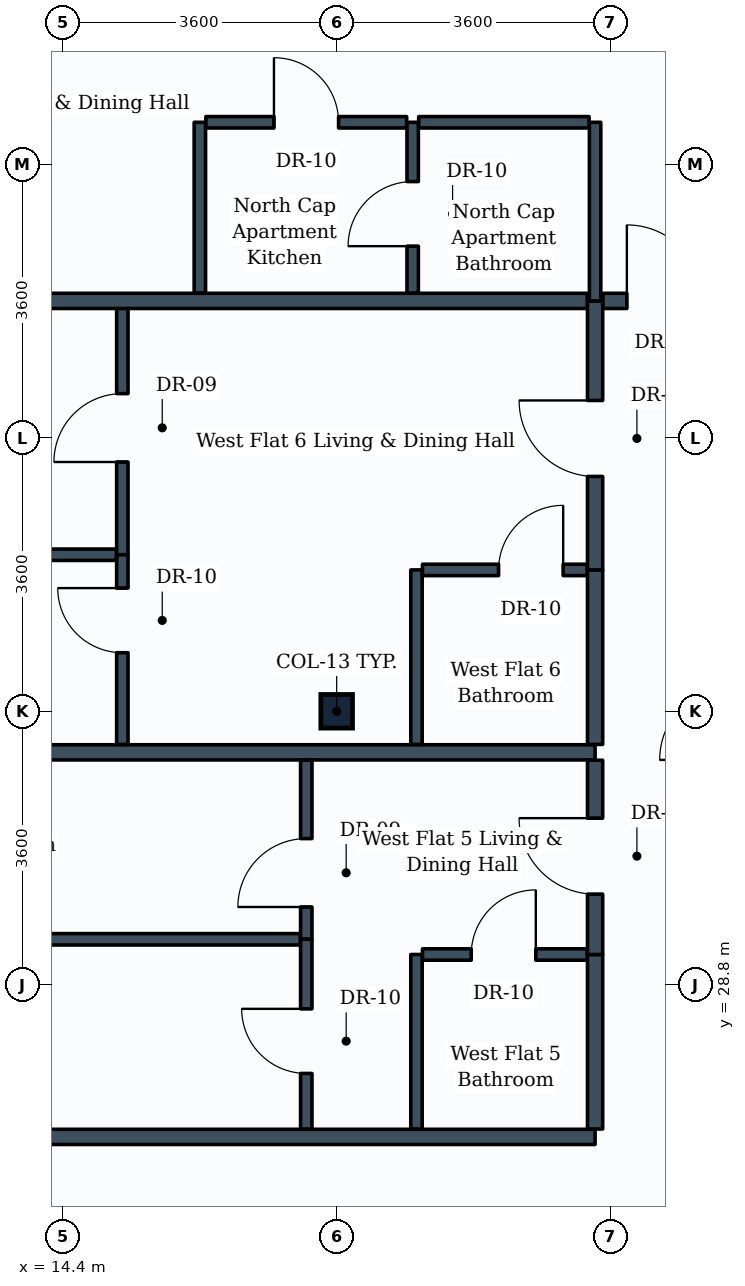
"""IFC4 building model, lengths in metres.
Left out: names, types, materials, properties, quantities, classifications, styles, units other than length and angle.
Written with IfcOpenShell. Run it as: python <this file> out.ifc"""

import sys

from ifc_helpers import new_model, si_unit, direction, frame, frame_2d, origin, origin_2d, place, context, subcontext, project, spatial, rectangle, i_section, extrude, element, fill, save


model = new_model("IFC4")
c1 = context("Model", 3, precision=1e-05, world=origin(), true_north=direction((0.0, 1.0)))
c2 = subcontext(c1, "Body", "Model", "MODEL_VIEW")
j1 = project(units=[si_unit("LENGTHUNIT", "METRE"), si_unit("PLANEANGLEUNIT", "RADIAN")], contexts=[c1])
p1 = place(None, origin())
s1 = spatial("IfcSite", under=j1, at=p1, CompositionType="ELEMENT")
p2 = place(p1, origin())
s2 = spatial("IfcBuilding", under=s1, at=p2, CompositionType="ELEMENT")
p3 = place(p2, frame((0.0, 0.0, 165.6)))
s3 = spatial("IfcBuildingStorey", under=s2, at=p3, CompositionType="ELEMENT", Elevation=165.6)
p4 = place(p3, frame((18.0, 32.4, 0.0), z_axis=(0.0, 0.0, 1.0), x_axis=(1.0, 0.0, 0.0)))
e1 = element("IfcColumn", 1, at=p4, inside=s3, PredefinedType="COLUMN", context=c2, shape_type="SweptSolid", body=[
    extrude(i_section(OverallWidth=0.416, OverallDepth=0.442, WebThickness=0.025, FlangeThickness=0.041, FilletRadius=0.015, at=origin_2d()), origin(), (0.0, 0.0, 1.0), 3.8),
])
for number, where, z_axis, x_axis in (
    (2, (7.354, 26.8, 0.0), (0.0, 0.0, 1.0), (1.0, 0.0, 0.0)),
    (3, (7.354, 31.86, 0.0), (0.0, 0.0, 1.0), (1.0, 0.0, 0.0)),
):
    element("IfcWall", number, at=place(p3, frame(where, z_axis=z_axis, x_axis=x_axis)), inside=s3, PredefinedType="PARTITIONING", context=c2, shape_type="SweptSolid", body=[
        extrude(rectangle(XDim=14.046, YDim=0.2, at=frame_2d((7.023, 0.0))), origin(), (0.0, 0.0, 1.0), 2.93),
    ])
p5 = place(p3, frame((21.4, 26.904, 0.0), z_axis=(0.0, 0.0, 1.0), x_axis=(0.0, 1.0, 0.0)))
e4 = element("IfcWall", 4, at=p5, inside=s3, PredefinedType="PARTITIONING", context=c2, shape_type="SweptSolid", body=[
    extrude(rectangle(XDim=2.296, YDim=0.2, at=frame_2d((1.148, 0.0))), origin(), (0.0, 0.0, 1.0), 3.1),
])
p6 = place(p3, frame((19.05, 26.904, 0.0), z_axis=(0.0, 0.0, 1.0), x_axis=(0.0, 1.0, 0.0)))
e5 = element("IfcWall", 5, at=p6, inside=s3, PredefinedType="PARTITIONING", context=c2, shape_type="SweptSolid", body=[
    extrude(rectangle(XDim=2.296, YDim=0.15, at=frame_2d((1.148, 0.0))), origin(), (0.0, 0.0, 1.0), 3.1),
])
p7 = place(p3, frame((19.129, 29.2, 0.0), z_axis=(0.0, 0.0, 1.0), x_axis=(1.0, 0.0, 0.0)))
e6 = element("IfcWall", 6, at=p7, inside=s3, PredefinedType="PARTITIONING", context=c2, shape_type="SweptSolid", body=[
    extrude(rectangle(XDim=2.167, YDim=0.15, at=frame_2d((1.083, 0.0))), origin(), (0.0, 0.0, 1.0), 3.465),
])
p8 = place(p7, frame((0.641, 0.0, 0.0)))
e7 = element("IfcOpeningElement", 7, at=p8, cuts=e6, PredefinedType="OPENING", context=c2, shape_type="SweptSolid", body=[
    extrude(rectangle(XDim=0.85, YDim=2.1, at=frame_2d((0.425, 1.05))), frame((0.0, 0.085, 0.0), z_axis=(0.0, -1.0, 0.0), x_axis=(1.0, 0.0, 0.0)), (0.0, 0.0, 1.0), 0.17),
])
p9 = place(p3, frame((21.4, 29.2, 0.0), z_axis=(0.0, 0.0, 1.0), x_axis=(0.0, 1.0, 0.0)))
e8 = element("IfcWall", 8, at=p9, inside=s3, PredefinedType="PARTITIONING", context=c2, shape_type="SweptSolid", body=[
    extrude(rectangle(XDim=2.556, YDim=0.2, at=frame_2d((1.278, 0.0))), origin(), (0.0, 0.0, 1.0), 3.13),
])
p10 = place(p9, frame((0.794, 0.0, 0.0)))
e9 = element("IfcOpeningElement", 9, at=p10, cuts=e8, PredefinedType="OPENING", context=c2, shape_type="SweptSolid", body=[
    extrude(rectangle(XDim=1.0, YDim=2.1, at=frame_2d((0.5, 1.05))), frame((0.0, 0.11, 0.0), z_axis=(0.0, -1.0, 0.0), x_axis=(1.0, 0.0, 0.0)), (0.0, 0.0, 1.0), 0.22),
])
p11 = place(p3, frame((17.6, 29.4, 0.0), z_axis=(0.0, 0.0, 1.0), x_axis=(0.0, 1.0, 0.0)))
e10 = element("IfcWall", 10, at=p11, inside=s3, PredefinedType="PARTITIONING", context=c2, shape_type="SweptSolid", body=[
    extrude(rectangle(XDim=2.356, YDim=0.15, at=frame_2d((1.178, 0.0))), origin(), (0.0, 0.0, 1.0), 3.465),
])
p12 = place(p11, frame((0.425, 0.0, 0.0)))
e11 = element("IfcOpeningElement", 11, at=p12, cuts=e10, PredefinedType="OPENING", context=c2, shape_type="SweptSolid", body=[
    extrude(rectangle(XDim=0.9, YDim=2.1, at=frame_2d((0.45, 1.05))), frame((0.0, 0.085, 0.0), z_axis=(0.0, -1.0, 0.0), x_axis=(1.0, 0.0, 0.0)), (0.0, 0.0, 1.0), 0.17),
])
p13 = place(p3, frame((17.6, 26.904, 0.0), z_axis=(0.0, 0.0, 1.0), x_axis=(0.0, 1.0, 0.0)))
e12 = element("IfcWall", 12, at=p13, inside=s3, PredefinedType="PARTITIONING", context=c2, shape_type="SweptSolid", body=[
    extrude(rectangle(XDim=2.496, YDim=0.15, at=frame_2d((1.248, 0.0))), origin(), (0.0, 0.0, 1.0), 3.1),
])
p14 = place(p13, frame((0.731, 0.0, 0.0)))
e13 = element("IfcOpeningElement", 13, at=p14, cuts=e12, PredefinedType="OPENING", context=c2, shape_type="SweptSolid", body=[
    extrude(rectangle(XDim=0.85, YDim=2.1, at=frame_2d((0.425, 1.05))), frame((0.0, 0.085, 0.0), z_axis=(0.0, -1.0, 0.0), x_axis=(1.0, 0.0, 0.0)), (0.0, 0.0, 1.0), 0.17),
])
p15 = place(p3, frame((7.354, 29.4, 0.0), z_axis=(0.0, 0.0, 1.0), x_axis=(1.0, 0.0, 0.0)))
e14 = element("IfcWall", 14, at=p15, inside=s3, PredefinedType="PARTITIONING", context=c2, shape_type="SweptSolid", body=[
    extrude(rectangle(XDim=10.167, YDim=0.15, at=frame_2d((5.083, 0.0))), origin(), (0.0, 0.0, 1.0), 2.93),
])
p16 = place(p3, frame((21.4, 31.964, 0.0), z_axis=(0.0, 0.0, 1.0), x_axis=(0.0, 1.0, 0.0)))
e15 = element("IfcWall", 15, at=p16, inside=s3, PredefinedType="PARTITIONING", context=c2, shape_type="SweptSolid", body=[
    extrude(rectangle(XDim=2.296, YDim=0.2, at=frame_2d((1.148, 0.0))), origin(), (0.0, 0.0, 1.0), 3.11),
])
p17 = place(p3, frame((19.05, 31.964, 0.0), z_axis=(0.0, 0.0, 1.0), x_axis=(0.0, 1.0, 0.0)))
e16 = element("IfcWall", 16, at=p17, inside=s3, PredefinedType="PARTITIONING", context=c2, shape_type="SweptSolid", body=[
    extrude(rectangle(XDim=2.296, YDim=0.15, at=frame_2d((1.148, 0.0))), origin(), (0.0, 0.0, 1.0), 3.11),
])
p18 = place(p3, frame((19.129, 34.26, 0.0), z_axis=(0.0, 0.0, 1.0), x_axis=(1.0, 0.0, 0.0)))
e17 = element("IfcWall", 17, at=p18, inside=s3, PredefinedType="PARTITIONING", context=c2, shape_type="SweptSolid", body=[
    extrude(rectangle(XDim=2.167, YDim=0.15, at=frame_2d((1.083, 0.0))), origin(), (0.0, 0.0, 1.0), 3.465),
])
p19 = place(p18, frame((1.001, 0.0, 0.0)))
e18 = element("IfcOpeningElement", 18, at=p19, cuts=e17, PredefinedType="OPENING", context=c2, shape_type="SweptSolid", body=[
    extrude(rectangle(XDim=0.85, YDim=2.1, at=frame_2d((0.425, 1.05))), frame((0.0, 0.085, 0.0), z_axis=(0.0, -1.0, 0.0), x_axis=(1.0, 0.0, 0.0)), (0.0, 0.0, 1.0), 0.17),
])
p20 = place(p3, frame((21.4, 34.26, 0.0), z_axis=(0.0, 0.0, 1.0), x_axis=(0.0, 1.0, 0.0)))
e19 = element("IfcWall", 19, at=p20, inside=s3, PredefinedType="PARTITIONING", context=c2, shape_type="SweptSolid", body=[
    extrude(rectangle(XDim=3.54, YDim=0.2, at=frame_2d((1.77, 0.0))), origin(), (0.0, 0.0, 1.0), 3.1),
])
p21 = place(p20, frame((1.23, 0.0, 0.0)))
e20 = element("IfcOpeningElement", 20, at=p21, cuts=e19, PredefinedType="OPENING", context=c2, shape_type="SweptSolid", body=[
    extrude(rectangle(XDim=1.0, YDim=2.1, at=frame_2d((0.5, 1.05))), frame((0.0, 0.11, 0.0), z_axis=(0.0, -1.0, 0.0), x_axis=(1.0, 0.0, 0.0)), (0.0, 0.0, 1.0), 0.22),
])
p22 = place(p3, frame((15.18, 34.46, 0.0), z_axis=(0.0, 0.0, 1.0), x_axis=(0.0, 1.0, 0.0)))
e21 = element("IfcWall", 21, at=p22, inside=s3, PredefinedType="PARTITIONING", context=c2, shape_type="SweptSolid", body=[
    extrude(rectangle(XDim=3.34, YDim=0.15, at=frame_2d((1.67, 0.0))), origin(), (0.0, 0.0, 1.0), 3.1),
])
p23 = place(p22, frame((1.22, 0.0, 0.0)))
e22 = element("IfcOpeningElement", 22, at=p23, cuts=e21, PredefinedType="OPENING", context=c2, shape_type="SweptSolid", body=[
    extrude(rectangle(XDim=0.9, YDim=2.1, at=frame_2d((0.45, 1.05))), frame((0.0, 0.085, 0.0), z_axis=(0.0, -1.0, 0.0), x_axis=(1.0, 0.0, 0.0)), (0.0, 0.0, 1.0), 0.17),
])
p24 = place(p3, frame((15.18, 31.964, 0.0), z_axis=(0.0, 0.0, 1.0), x_axis=(0.0, 1.0, 0.0)))
e23 = element("IfcWall", 23, at=p24, inside=s3, PredefinedType="PARTITIONING", context=c2, shape_type="SweptSolid", body=[
    extrude(rectangle(XDim=2.496, YDim=0.15, at=frame_2d((1.248, 0.0))), origin(), (0.0, 0.0, 1.0), 3.11),
])
p25 = place(p24, frame((1.207, 0.0, 0.0)))
e24 = element("IfcOpeningElement", 24, at=p25, cuts=e23, PredefinedType="OPENING", context=c2, shape_type="SweptSolid", body=[
    extrude(rectangle(XDim=0.85, YDim=2.1, at=frame_2d((0.425, 1.05))), frame((0.0, 0.085, 0.0), z_axis=(0.0, -1.0, 0.0), x_axis=(1.0, 0.0, 0.0)), (0.0, 0.0, 1.0), 0.17),
])
p26 = place(p3, frame((7.354, 34.46, 0.0), z_axis=(0.0, 0.0, 1.0), x_axis=(1.0, 0.0, 0.0)))
e25 = element("IfcWall", 25, at=p26, inside=s3, PredefinedType="PARTITIONING", context=c2, shape_type="SweptSolid", body=[
    extrude(rectangle(XDim=7.747, YDim=0.15, at=frame_2d((3.874, 0.0))), origin(), (0.0, 0.0, 1.0), 2.93),
])
p27 = place(p3, frame((7.354, 37.8, 0.0), z_axis=(0.0, 0.0, 1.0), x_axis=(1.0, 0.0, 0.0)))
e26 = element("IfcWall", 26, at=p27, inside=s3, PredefinedType="PARTITIONING", context=c2, shape_type="SweptSolid", body=[
    extrude(rectangle(XDim=13.942, YDim=0.2, at=frame_2d((6.971, 0.0))), origin(), (0.0, 0.0, 1.0), 2.93),
])
p28 = place(p3, frame((21.504, 37.8, 0.0), z_axis=(0.0, 0.0, 1.0), x_axis=(1.0, 0.0, 0.0)))
e27 = element("IfcWall", 27, at=p28, inside=s3, PredefinedType="PARTITIONING", context=c2, shape_type="SweptSolid", body=[
    extrude(rectangle(XDim=1.667, YDim=0.2, at=frame_2d((0.833, 0.0))), origin(), (0.0, 0.0, 1.0), 3.465),
])
p29 = place(p28, frame((0.314, 0.0, 0.0)))
e28 = element("IfcOpeningElement", 28, at=p29, cuts=e27, PredefinedType="OPENING", context=c2, shape_type="SweptSolid", body=[
    extrude(rectangle(XDim=1.0, YDim=2.1, at=frame_2d((0.5, 1.05))), frame((0.0, 0.11, 0.0), z_axis=(0.0, -1.0, 0.0), x_axis=(1.0, 0.0, 0.0)), (0.0, 0.0, 1.0), 0.22),
])
p30 = place(p3, frame((21.4, 37.8, 0.0), z_axis=(0.0, 0.0, 1.0), x_axis=(0.0, 1.0, 0.0)))
e29 = element("IfcWall", 29, at=p30, inside=s3, PredefinedType="PARTITIONING", context=c2, shape_type="SweptSolid", body=[
    extrude(rectangle(XDim=2.35, YDim=0.15, at=frame_2d((1.175, 0.0))), origin(), (0.0, 0.0, 1.0), 3.465),
])
p31 = place(p3, frame((19.0, 37.904, 0.0), z_axis=(0.0, 0.0, 1.0), x_axis=(0.0, 1.0, 0.0)))
e30 = element("IfcWall", 30, at=p31, inside=s3, PredefinedType="PARTITIONING", context=c2, shape_type="SweptSolid", body=[
    extrude(rectangle(XDim=2.246, YDim=0.15, at=frame_2d((1.123, 0.0))), origin(), (0.0, 0.0, 1.0), 3.465),
])
p32 = place(p31, frame((0.616, 0.0, 0.0)))
e31 = element("IfcOpeningElement", 31, at=p32, cuts=e30, PredefinedType="OPENING", context=c2, shape_type="SweptSolid", body=[
    extrude(rectangle(XDim=0.85, YDim=2.1, at=frame_2d((0.425, 1.05))), frame((0.0, 0.085, 0.0), z_axis=(0.0, -1.0, 0.0), x_axis=(1.0, 0.0, 0.0)), (0.0, 0.0, 1.0), 0.17),
])
p33 = place(p3, frame((19.079, 40.15, 0.0), z_axis=(0.0, 0.0, 1.0), x_axis=(1.0, 0.0, 0.0)))
e32 = element("IfcWall", 32, at=p33, inside=s3, PredefinedType="PARTITIONING", context=c2, shape_type="SweptSolid", body=[
    extrude(rectangle(XDim=2.242, YDim=0.15, at=frame_2d((1.121, 0.0))), origin(), (0.0, 0.0, 1.0), 3.465),
])
p34 = place(p3, frame((16.2, 37.904, 0.0), z_axis=(0.0, 0.0, 1.0), x_axis=(0.0, 1.0, 0.0)))
e33 = element("IfcWall", 33, at=p34, inside=s3, PredefinedType="PARTITIONING", context=c2, shape_type="SweptSolid", body=[
    extrude(rectangle(XDim=2.246, YDim=0.15, at=frame_2d((1.123, 0.0))), origin(), (0.0, 0.0, 1.0), 3.465),
])
p35 = place(p3, frame((16.279, 40.15, 0.0), z_axis=(0.0, 0.0, 1.0), x_axis=(1.0, 0.0, 0.0)))
e34 = element("IfcWall", 34, at=p35, inside=s3, PredefinedType="PARTITIONING", context=c2, shape_type="SweptSolid", body=[
    extrude(rectangle(XDim=2.642, YDim=0.15, at=frame_2d((1.321, 0.0))), origin(), (0.0, 0.0, 1.0), 3.1),
])
p36 = place(p35, frame((0.896, 0.0, 0.0)))
e35 = element("IfcOpeningElement", 35, at=p36, cuts=e34, PredefinedType="OPENING", context=c2, shape_type="SweptSolid", body=[
    extrude(rectangle(XDim=0.85, YDim=2.1, at=frame_2d((0.425, 1.05))), frame((0.0, 0.085, 0.0), z_axis=(0.0, -1.0, 0.0), x_axis=(1.0, 0.0, 0.0)), (0.0, 0.0, 1.0), 0.17),
])
p37 = place(p8, origin())
e36 = element("IfcDoor", 36, at=p37, inside=s3, OperationType="SINGLE_SWING_RIGHT", PredefinedType="DOOR", context=c2, shape_type="SweptSolid", body=[
    extrude(rectangle(XDim=0.85, YDim=2.1, at=frame_2d((0.425, 1.05))), frame((0.0, 0.025, 0.0), z_axis=(0.0, -1.0, 0.0), x_axis=(1.0, 0.0, 0.0)), (0.0, 0.0, 1.0), 0.05),
])
fill(e7, e36)
p38 = place(p10, origin())
e37 = element("IfcDoor", 37, at=p38, inside=s3, OperationType="SINGLE_SWING_RIGHT", PredefinedType="DOOR", context=c2, shape_type="SweptSolid", body=[
    extrude(rectangle(XDim=1.0, YDim=2.1, at=frame_2d((0.5, 1.05))), frame((0.0, 0.025, 0.0), z_axis=(0.0, -1.0, 0.0), x_axis=(1.0, 0.0, 0.0)), (0.0, 0.0, 1.0), 0.05),
])
fill(e9, e37)
p39 = place(p12, origin())
e38 = element("IfcDoor", 38, at=p39, inside=s3, OperationType="SINGLE_SWING_LEFT", PredefinedType="DOOR", context=c2, shape_type="SweptSolid", body=[
    extrude(rectangle(XDim=0.9, YDim=2.1, at=frame_2d((0.45, 1.05))), frame((0.0, 0.025, 0.0), z_axis=(0.0, -1.0, 0.0), x_axis=(1.0, 0.0, 0.0)), (0.0, 0.0, 1.0), 0.05),
])
fill(e11, e38)
p40 = place(p14, origin())
e39 = element("IfcDoor", 39, at=p40, inside=s3, OperationType="SINGLE_SWING_RIGHT", PredefinedType="DOOR", context=c2, shape_type="SweptSolid", body=[
    extrude(rectangle(XDim=0.85, YDim=2.1, at=frame_2d((0.425, 1.05))), frame((0.0, 0.025, 0.0), z_axis=(0.0, -1.0, 0.0), x_axis=(1.0, 0.0, 0.0)), (0.0, 0.0, 1.0), 0.05),
])
fill(e13, e39)
p41 = place(p19, origin())
e40 = element("IfcDoor", 40, at=p41, inside=s3, OperationType="SINGLE_SWING_RIGHT", PredefinedType="DOOR", context=c2, shape_type="SweptSolid", body=[
    extrude(rectangle(XDim=0.85, YDim=2.1, at=frame_2d((0.425, 1.05))), frame((0.0, 0.025, 0.0), z_axis=(0.0, -1.0, 0.0), x_axis=(1.0, 0.0, 0.0)), (0.0, 0.0, 1.0), 0.05),
])
fill(e18, e40)
p42 = place(p21, origin())
e41 = element("IfcDoor", 41, at=p42, inside=s3, OperationType="SINGLE_SWING_RIGHT", PredefinedType="DOOR", context=c2, shape_type="SweptSolid", body=[
    extrude(rectangle(XDim=1.0, YDim=2.1, at=frame_2d((0.5, 1.05))), frame((0.0, 0.025, 0.0), z_axis=(0.0, -1.0, 0.0), x_axis=(1.0, 0.0, 0.0)), (0.0, 0.0, 1.0), 0.05),
])
fill(e20, e41)
p43 = place(p23, origin())
e42 = element("IfcDoor", 42, at=p43, inside=s3, OperationType="SINGLE_SWING_LEFT", PredefinedType="DOOR", context=c2, shape_type="SweptSolid", body=[
    extrude(rectangle(XDim=0.9, YDim=2.1, at=frame_2d((0.45, 1.05))), frame((0.0, 0.025, 0.0), z_axis=(0.0, -1.0, 0.0), x_axis=(1.0, 0.0, 0.0)), (0.0, 0.0, 1.0), 0.05),
])
fill(e22, e42)
p44 = place(p25, origin())
e43 = element("IfcDoor", 43, at=p44, inside=s3, OperationType="SINGLE_SWING_RIGHT", PredefinedType="DOOR", context=c2, shape_type="SweptSolid", body=[
    extrude(rectangle(XDim=0.85, YDim=2.1, at=frame_2d((0.425, 1.05))), frame((0.0, 0.025, 0.0), z_axis=(0.0, -1.0, 0.0), x_axis=(1.0, 0.0, 0.0)), (0.0, 0.0, 1.0), 0.05),
])
fill(e24, e43)
p45 = place(p29, origin())
e44 = element("IfcDoor", 44, at=p45, inside=s3, OperationType="SINGLE_SWING_LEFT", PredefinedType="DOOR", context=c2, shape_type="SweptSolid", body=[
    extrude(rectangle(XDim=1.0, YDim=2.1, at=frame_2d((0.5, 1.05))), frame((0.0, 0.025, 0.0), z_axis=(0.0, -1.0, 0.0), x_axis=(1.0, 0.0, 0.0)), (0.0, 0.0, 1.0), 0.05),
])
fill(e28, e44)
p46 = place(p32, origin())
e45 = element("IfcDoor", 45, at=p46, inside=s3, OperationType="SINGLE_SWING_LEFT", PredefinedType="DOOR", context=c2, shape_type="SweptSolid", body=[
    extrude(rectangle(XDim=0.85, YDim=2.1, at=frame_2d((0.425, 1.05))), frame((0.0, 0.025, 0.0), z_axis=(0.0, -1.0, 0.0), x_axis=(1.0, 0.0, 0.0)), (0.0, 0.0, 1.0), 0.05),
])
fill(e31, e45)
p47 = place(p36, origin())
e46 = element("IfcDoor", 46, at=p47, inside=s3, OperationType="SINGLE_SWING_LEFT", PredefinedType="DOOR", context=c2, shape_type="SweptSolid", body=[
    extrude(rectangle(XDim=0.85, YDim=2.1, at=frame_2d((0.425, 1.05))), frame((0.0, 0.025, 0.0), z_axis=(0.0, -1.0, 0.0), x_axis=(1.0, 0.0, 0.0)), (0.0, 0.0, 1.0), 0.05),
])
fill(e35, e46)
save(model, sys.argv[1])
